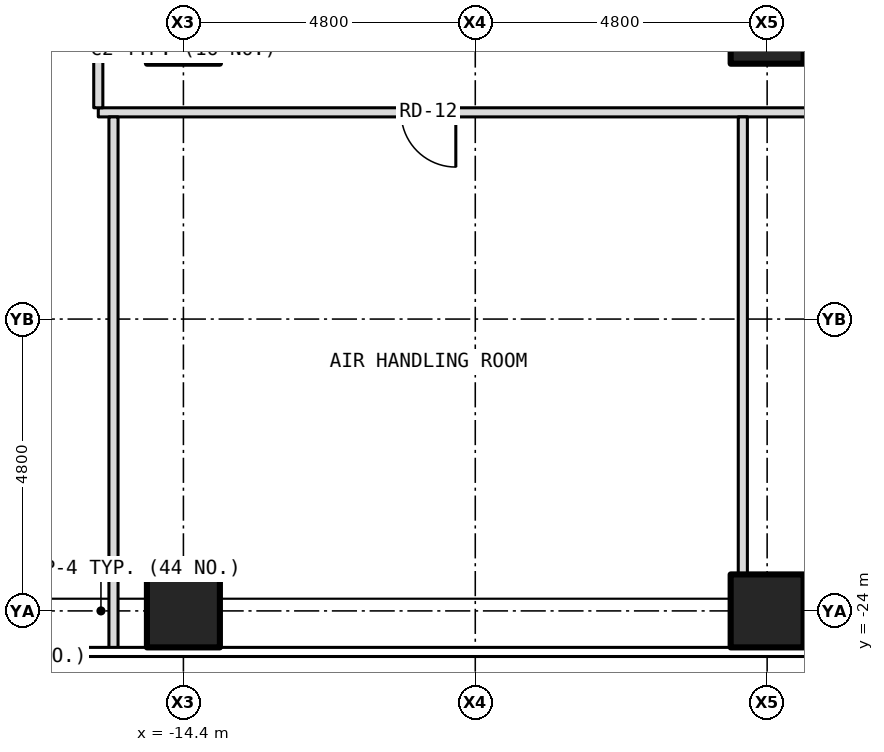
"""IFC4 building model, lengths in metres.
Left out: names, types, materials, properties, quantities, classifications, styles, units other than length and angle.
Written with IfcOpenShell. Run it as: python <this file> out.ifc"""

import sys

from ifc_helpers import new_model, si_unit, direction, frame, frame_2d, origin, origin_2d, place, context, subcontext, project, spatial, rectangle, hollow_rectangle, extrude, element, fill, save


model = new_model("IFC4")
c1 = context("Model", 3, precision=1e-05, world=origin(), true_north=direction((0.0, 1.0)))
c2 = subcontext(c1, "Body", "Model", "MODEL_VIEW")
j1 = project(units=[si_unit("LENGTHUNIT", "METRE"), si_unit("PLANEANGLEUNIT", "RADIAN")], contexts=[c1])
p1 = place(None, origin())
s1 = spatial("IfcSite", under=j1, at=p1, CompositionType="ELEMENT")
p2 = place(p1, origin())
s2 = spatial("IfcBuilding", under=s1, at=p2, CompositionType="ELEMENT")
p3 = place(p2, frame((0.0, 0.0, 33.5)))
s3 = spatial("IfcBuildingStorey", under=s2, at=p3, CompositionType="ELEMENT", Elevation=33.5)
for number, where, z_axis, x_axis in (
    (1, (-14.4, -24.0, -0.3), (0.0, 0.0, 1.0), (1.0, 0.0, 0.0)),
    (2, (-4.8, -24.0, -0.3), (0.0, 0.0, 1.0), (1.0, 0.0, 0.0)),
    (3, (-14.4, -14.4, -0.3), (0.0, 0.0, 1.0), (1.0, 0.0, 0.0)),
    (4, (-4.8, -14.4, -0.3), (0.0, 0.0, 1.0), (1.0, 0.0, 0.0)),
):
    element("IfcColumn", number, at=place(p3, frame(where, z_axis=z_axis, x_axis=x_axis)), inside=s3, PredefinedType="COLUMN", context=c2, shape_type="SweptSolid", body=[
        extrude(hollow_rectangle(XDim=1.2, YDim=1.2, WallThickness=0.07, at=origin_2d()), origin(), (0.0, 0.0, 1.0), 5.65),
    ])
p4 = place(p3, frame((-15.8, -15.8, 0.0), z_axis=(0.0, 0.0, 1.0), x_axis=(1.0, 0.0, 0.0)))
e5 = element("IfcWall", 5, at=p4, inside=s3, PredefinedType="PARTITIONING", context=c2, shape_type="SweptSolid", body=[
    extrude(rectangle(XDim=31.6, YDim=0.15, at=frame_2d((15.8, 0.0))), origin(), (0.0, 0.0, 1.0), 5.35),
])
p5 = place(p4, frame((4.98, 0.0, 0.0)))
e6 = element("IfcOpeningElement", 6, at=p5, cuts=e5, PredefinedType="OPENING", context=c2, shape_type="SweptSolid", body=[
    extrude(rectangle(XDim=0.9, YDim=2.1, at=frame_2d((0.45, 1.05))), frame((0.0, 0.087, 0.0), z_axis=(0.0, -1.0, 0.0), x_axis=(1.0, 0.0, 0.0)), (0.0, 0.0, 1.0), 0.174),
])
p6 = place(p4, frame((15.35, 0.0, 0.0)))
e7 = element("IfcOpeningElement", 7, at=p6, cuts=e5, PredefinedType="OPENING", context=c2, shape_type="SweptSolid", body=[
    extrude(rectangle(XDim=0.9, YDim=2.1, at=frame_2d((0.45, 1.05))), frame((0.0, 0.087, 0.0), z_axis=(0.0, -1.0, 0.0), x_axis=(1.0, 0.0, 0.0)), (0.0, 0.0, 1.0), 0.174),
])
p7 = place(p4, frame((25.721, 0.0, 0.0)))
e8 = element("IfcOpeningElement", 8, at=p7, cuts=e5, PredefinedType="OPENING", context=c2, shape_type="SweptSolid", body=[
    extrude(rectangle(XDim=0.9, YDim=2.1, at=frame_2d((0.45, 1.05))), frame((0.0, 0.087, 0.0), z_axis=(0.0, -1.0, 0.0), x_axis=(1.0, 0.0, 0.0)), (0.0, 0.0, 1.0), 0.174),
])
p8 = place(p3, frame((-15.8, -15.725, 0.0), z_axis=(0.0, 0.0, 1.0), x_axis=(0.0, 1.0, 0.0)))
e9 = element("IfcWall", 9, at=p8, inside=s3, PredefinedType="PARTITIONING", context=c2, shape_type="SweptSolid", body=[
    extrude(rectangle(XDim=4.805, YDim=0.15, at=frame_2d((2.403, 0.0))), origin(), (0.0, 0.0, 1.0), 5.35),
])
p9 = place(p8, frame((3.075, 0.0, 0.0)))
e10 = element("IfcOpeningElement", 10, at=p9, cuts=e9, PredefinedType="OPENING", context=c2, shape_type="SweptSolid", body=[
    extrude(rectangle(XDim=0.9, YDim=2.1, at=frame_2d((0.45, 1.05))), frame((0.0, 0.087, 0.0), z_axis=(0.0, -1.0, 0.0), x_axis=(1.0, 0.0, 0.0)), (0.0, 0.0, 1.0), 0.174),
])
p10 = place(p3, frame((-15.55, -24.63, 0.0), z_axis=(0.0, 0.0, 1.0), x_axis=(0.0, 1.0, 0.0)))
e11 = element("IfcWall", 11, at=p10, inside=s3, PredefinedType="PARTITIONING", context=c2, shape_type="SweptSolid", body=[
    extrude(rectangle(XDim=8.755, YDim=0.15, at=frame_2d((4.377, 0.0))), origin(), (0.0, 0.0, 1.0), 5.35),
])
p11 = place(p3, frame((-5.2, -23.88, 0.0), z_axis=(0.0, 0.0, 1.0), x_axis=(0.0, 1.0, 0.0)))
e12 = element("IfcWall", 12, at=p11, inside=s3, PredefinedType="PARTITIONING", context=c2, shape_type="SweptSolid", body=[
    extrude(rectangle(XDim=8.005, YDim=0.15, at=frame_2d((4.002, 0.0))), origin(), (0.0, 0.0, 1.0), 5.35),
])
p12 = place(p5, origin())
e13 = element("IfcDoor", 13, at=p12, inside=s3, OperationType="SINGLE_SWING_RIGHT", PredefinedType="DOOR", context=c2, shape_type="SweptSolid", body=[
    extrude(rectangle(XDim=0.9, YDim=2.1, at=frame_2d((0.45, 1.05))), frame((0.0, 0.025, 0.0), z_axis=(0.0, -1.0, 0.0), x_axis=(1.0, 0.0, 0.0)), (0.0, 0.0, 1.0), 0.05),
])
fill(e6, e13)
save(model, sys.argv[1])
